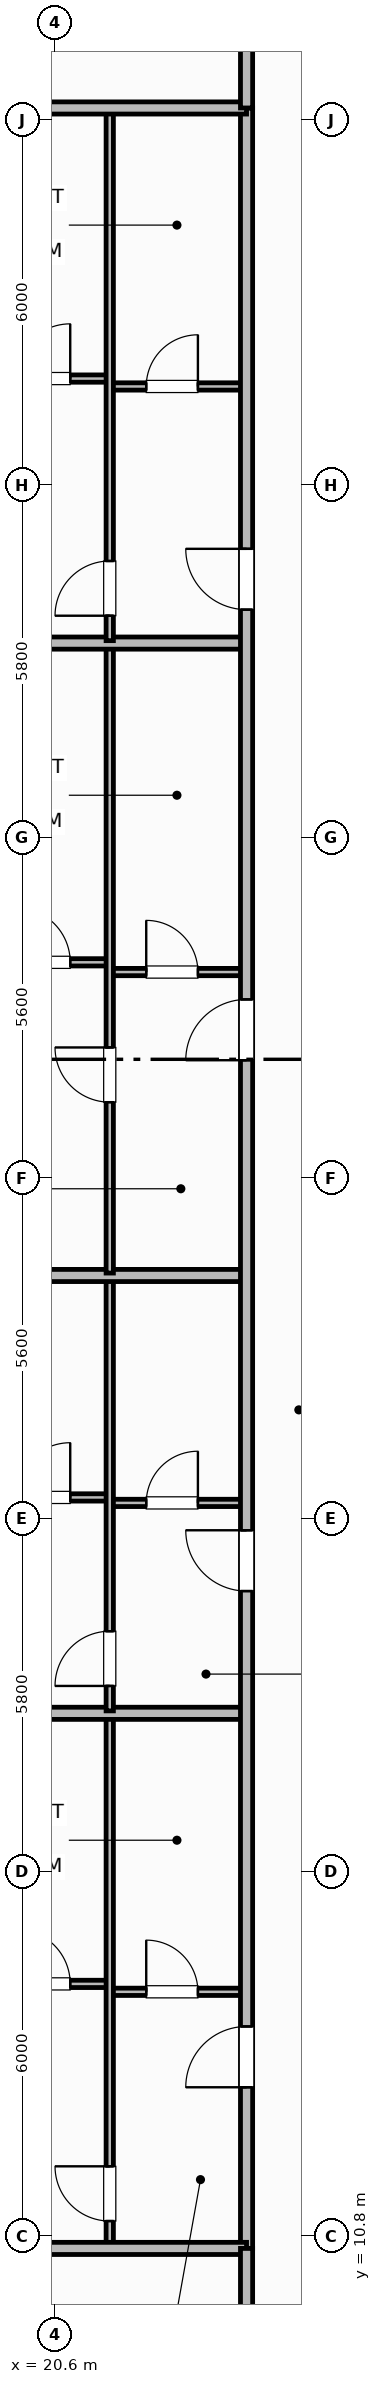
"""IFC4 building model, lengths in metres.
Left out: names, types, materials, properties, quantities, classifications, styles, units other than length and angle.
Written with IfcOpenShell. Run it as: python <this file> out.ifc"""

import sys

from ifc_helpers import new_model, si_unit, direction, frame, frame_2d, origin, place, context, subcontext, project, spatial, rectangle, extrude, element, fill, save


model = new_model("IFC4")
c1 = context("Model", 3, precision=1e-05, world=origin(), true_north=direction((0.0, 1.0)))
c2 = subcontext(c1, "Body", "Model", "MODEL_VIEW")
j1 = project(units=[si_unit("LENGTHUNIT", "METRE"), si_unit("PLANEANGLEUNIT", "RADIAN")], contexts=[c1])
p1 = place(None, origin())
s1 = spatial("IfcSite", under=j1, at=p1, CompositionType="ELEMENT")
p2 = place(p1, origin())
s2 = spatial("IfcBuilding", under=s1, at=p2, CompositionType="ELEMENT")
p3 = place(p2, frame((0.0, 0.0, 47.3)))
s3 = spatial("IfcBuildingStorey", under=s2, at=p3, CompositionType="ELEMENT", Elevation=47.3)
p4 = place(p3, frame((21.5, 14.82, 0.0), z_axis=(0.0, 0.0, 1.0), x_axis=(1.0, 0.0, 0.0)))
e1 = element("IfcWall", 1, at=p4, inside=s3, PredefinedType="PARTITIONING", context=c2, shape_type="SweptSolid", body=[
    extrude(rectangle(XDim=2.25, YDim=0.12, at=frame_2d((1.125, 0.0))), origin(), (0.0, 0.0, 1.0), 2.53),
])
p5 = place(p4, frame((0.6, 0.0, 0.0)))
e2 = element("IfcOpeningElement", 2, at=p5, cuts=e1, PredefinedType="OPENING", context=c2, shape_type="SweptSolid", body=[
    extrude(rectangle(XDim=0.85, YDim=2.1, at=frame_2d((0.425, 1.05))), frame((0.0, 0.07, 0.0), z_axis=(0.0, -1.0, 0.0), x_axis=(1.0, 0.0, 0.0)), (0.0, 0.0, 1.0), 0.14),
])
p6 = place(p3, frame((14.57, 14.95, 0.0), z_axis=(0.0, 0.0, 1.0), x_axis=(1.0, 0.0, 0.0)))
e3 = element("IfcWall", 3, at=p6, inside=s3, PredefinedType="PARTITIONING", context=c2, shape_type="SweptSolid", body=[
    extrude(rectangle(XDim=6.93, YDim=0.12, at=frame_2d((3.465, 0.0))), origin(), (0.0, 0.0, 1.0), 2.53),
])
p7 = place(p6, frame((5.38, 0.0, 0.0)))
e4 = element("IfcOpeningElement", 4, at=p7, cuts=e3, PredefinedType="OPENING", context=c2, shape_type="SweptSolid", body=[
    extrude(rectangle(XDim=0.9, YDim=2.1, at=frame_2d((0.45, 1.05))), frame((0.0, 0.07, 0.0), z_axis=(0.0, -1.0, 0.0), x_axis=(1.0, 0.0, 0.0)), (0.0, 0.0, 1.0), 0.14),
])
p8 = place(p3, frame((21.5, 10.64, 0.0), z_axis=(0.0, 0.0, 1.0), x_axis=(0.0, 1.0, 0.0)))
e5 = element("IfcWall", 5, at=p8, inside=s3, PredefinedType="PARTITIONING", context=c2, shape_type="SweptSolid", body=[
    extrude(rectangle(XDim=8.72, YDim=0.12, at=frame_2d((4.36, 0.0))), origin(), (0.0, 0.0, 1.0), 2.53),
])
p9 = place(p8, frame((0.41, 0.0, 0.0)))
e6 = element("IfcOpeningElement", 6, at=p9, cuts=e5, PredefinedType="OPENING", context=c2, shape_type="SweptSolid", body=[
    extrude(rectangle(XDim=0.9, YDim=2.1, at=frame_2d((0.45, 1.05))), frame((0.0, 0.07, 0.0), z_axis=(0.0, -1.0, 0.0), x_axis=(1.0, 0.0, 0.0)), (0.0, 0.0, 1.0), 0.14),
])
p10 = place(p3, frame((14.57, 19.4, 0.0), z_axis=(0.0, 0.0, 1.0), x_axis=(1.0, 0.0, 0.0)))
e7 = element("IfcWall", 7, at=p10, inside=s3, PredefinedType="PARTITIONING", context=c2, shape_type="SweptSolid", body=[
    extrude(rectangle(XDim=9.18, YDim=0.2, at=frame_2d((4.59, 0.0))), origin(), (0.0, 0.0, 1.0), 2.53),
])
p11 = place(p3, frame((21.5, 22.86, 0.0), z_axis=(0.0, 0.0, 1.0), x_axis=(1.0, 0.0, 0.0)))
e8 = element("IfcWall", 8, at=p11, inside=s3, PredefinedType="PARTITIONING", context=c2, shape_type="SweptSolid", body=[
    extrude(rectangle(XDim=2.25, YDim=0.12, at=frame_2d((1.125, 0.0))), origin(), (0.0, 0.0, 1.0), 2.53),
])
p12 = place(p11, frame((0.6, 0.0, 0.0)))
e9 = element("IfcOpeningElement", 9, at=p12, cuts=e8, PredefinedType="OPENING", context=c2, shape_type="SweptSolid", body=[
    extrude(rectangle(XDim=0.85, YDim=2.1, at=frame_2d((0.425, 1.05))), frame((0.0, 0.07, 0.0), z_axis=(0.0, -1.0, 0.0), x_axis=(1.0, 0.0, 0.0)), (0.0, 0.0, 1.0), 0.14),
])
p13 = place(p3, frame((14.57, 22.95, 0.0), z_axis=(0.0, 0.0, 1.0), x_axis=(1.0, 0.0, 0.0)))
e10 = element("IfcWall", 10, at=p13, inside=s3, PredefinedType="PARTITIONING", context=c2, shape_type="SweptSolid", body=[
    extrude(rectangle(XDim=6.93, YDim=0.12, at=frame_2d((3.465, 0.0))), origin(), (0.0, 0.0, 1.0), 2.53),
])
p14 = place(p13, frame((5.38, 0.0, 0.0)))
e11 = element("IfcOpeningElement", 11, at=p14, cuts=e10, PredefinedType="OPENING", context=c2, shape_type="SweptSolid", body=[
    extrude(rectangle(XDim=0.9, YDim=2.1, at=frame_2d((0.45, 1.05))), frame((0.0, 0.07, 0.0), z_axis=(0.0, -1.0, 0.0), x_axis=(1.0, 0.0, 0.0)), (0.0, 0.0, 1.0), 0.14),
])
p15 = place(p3, frame((21.5, 19.44, 0.0), z_axis=(0.0, 0.0, 1.0), x_axis=(0.0, 1.0, 0.0)))
e12 = element("IfcWall", 12, at=p15, inside=s3, PredefinedType="PARTITIONING", context=c2, shape_type="SweptSolid", body=[
    extrude(rectangle(XDim=7.12, YDim=0.12, at=frame_2d((3.56, 0.0))), origin(), (0.0, 0.0, 1.0), 2.53),
])
p16 = place(p15, frame((0.41, 0.0, 0.0)))
e13 = element("IfcOpeningElement", 13, at=p16, cuts=e12, PredefinedType="OPENING", context=c2, shape_type="SweptSolid", body=[
    extrude(rectangle(XDim=0.9, YDim=2.1, at=frame_2d((0.45, 1.05))), frame((0.0, 0.07, 0.0), z_axis=(0.0, -1.0, 0.0), x_axis=(1.0, 0.0, 0.0)), (0.0, 0.0, 1.0), 0.14),
])
p17 = place(p3, frame((15.284, 26.6, 0.0), z_axis=(0.0, 0.0, 1.0), x_axis=(1.0, 0.0, 0.0)))
e14 = element("IfcWall", 14, at=p17, inside=s3, PredefinedType="PARTITIONING", context=c2, shape_type="SweptSolid", body=[
    extrude(rectangle(XDim=8.466, YDim=0.2, at=frame_2d((4.233, 0.0))), origin(), (0.0, 0.0, 1.0), 2.53),
])
p18 = place(p3, frame((21.5, 31.59, 0.0), z_axis=(0.0, 0.0, 1.0), x_axis=(1.0, 0.0, 0.0)))
e15 = element("IfcWall", 15, at=p18, inside=s3, PredefinedType="PARTITIONING", context=c2, shape_type="SweptSolid", body=[
    extrude(rectangle(XDim=2.25, YDim=0.12, at=frame_2d((1.125, 0.0))), origin(), (0.0, 0.0, 1.0), 2.53),
])
p19 = place(p18, frame((0.6, 0.0, 0.0)))
e16 = element("IfcOpeningElement", 16, at=p19, cuts=e15, PredefinedType="OPENING", context=c2, shape_type="SweptSolid", body=[
    extrude(rectangle(XDim=0.85, YDim=2.1, at=frame_2d((0.425, 1.05))), frame((0.0, 0.07, 0.0), z_axis=(0.0, -1.0, 0.0), x_axis=(1.0, 0.0, 0.0)), (0.0, 0.0, 1.0), 0.14),
])
p20 = place(p3, frame((15.053, 31.75, 0.0), z_axis=(0.0, 0.0, 1.0), x_axis=(1.0, 0.0, 0.0)))
e17 = element("IfcWall", 17, at=p20, inside=s3, PredefinedType="PARTITIONING", context=c2, shape_type="SweptSolid", body=[
    extrude(rectangle(XDim=6.447, YDim=0.12, at=frame_2d((3.224, 0.0))), origin(), (0.0, 0.0, 1.0), 2.53),
])
p21 = place(p20, frame((4.897, 0.0, 0.0)))
e18 = element("IfcOpeningElement", 18, at=p21, cuts=e17, PredefinedType="OPENING", context=c2, shape_type="SweptSolid", body=[
    extrude(rectangle(XDim=0.9, YDim=2.1, at=frame_2d((0.45, 1.05))), frame((0.0, 0.07, 0.0), z_axis=(0.0, -1.0, 0.0), x_axis=(1.0, 0.0, 0.0)), (0.0, 0.0, 1.0), 0.14),
])
p22 = place(p3, frame((21.5, 26.64, 0.0), z_axis=(0.0, 0.0, 1.0), x_axis=(0.0, 1.0, 0.0)))
e19 = element("IfcWall", 19, at=p22, inside=s3, PredefinedType="PARTITIONING", context=c2, shape_type="SweptSolid", body=[
    extrude(rectangle(XDim=10.32, YDim=0.12, at=frame_2d((5.16, 0.0))), origin(), (0.0, 0.0, 1.0), 2.53),
])
p23 = place(p22, frame((2.81, 0.0, 0.0)))
e20 = element("IfcOpeningElement", 20, at=p23, cuts=e19, PredefinedType="OPENING", context=c2, shape_type="SweptSolid", body=[
    extrude(rectangle(XDim=0.9, YDim=2.1, at=frame_2d((0.45, 1.05))), frame((0.0, 0.07, 0.0), z_axis=(0.0, -1.0, 0.0), x_axis=(1.0, 0.0, 0.0)), (0.0, 0.0, 1.0), 0.14),
])
p24 = place(p3, frame((14.57, 37.0, 0.0), z_axis=(0.0, 0.0, 1.0), x_axis=(1.0, 0.0, 0.0)))
e21 = element("IfcWall", 21, at=p24, inside=s3, PredefinedType="PARTITIONING", context=c2, shape_type="SweptSolid", body=[
    extrude(rectangle(XDim=9.18, YDim=0.2, at=frame_2d((4.59, 0.0))), origin(), (0.0, 0.0, 1.0), 2.53),
])
p25 = place(p3, frame((21.5, 41.22, 0.0), z_axis=(0.0, 0.0, 1.0), x_axis=(1.0, 0.0, 0.0)))
e22 = element("IfcWall", 22, at=p25, inside=s3, PredefinedType="PARTITIONING", context=c2, shape_type="SweptSolid", body=[
    extrude(rectangle(XDim=2.25, YDim=0.12, at=frame_2d((1.125, 0.0))), origin(), (0.0, 0.0, 1.0), 2.53),
])
p26 = place(p25, frame((0.6, 0.0, 0.0)))
e23 = element("IfcOpeningElement", 23, at=p26, cuts=e22, PredefinedType="OPENING", context=c2, shape_type="SweptSolid", body=[
    extrude(rectangle(XDim=0.85, YDim=2.1, at=frame_2d((0.425, 1.05))), frame((0.0, 0.07, 0.0), z_axis=(0.0, -1.0, 0.0), x_axis=(1.0, 0.0, 0.0)), (0.0, 0.0, 1.0), 0.14),
])
p27 = place(p3, frame((14.57, 41.35, 0.0), z_axis=(0.0, 0.0, 1.0), x_axis=(1.0, 0.0, 0.0)))
e24 = element("IfcWall", 24, at=p27, inside=s3, PredefinedType="PARTITIONING", context=c2, shape_type="SweptSolid", body=[
    extrude(rectangle(XDim=6.93, YDim=0.12, at=frame_2d((3.465, 0.0))), origin(), (0.0, 0.0, 1.0), 2.53),
])
p28 = place(p27, frame((5.38, 0.0, 0.0)))
e25 = element("IfcOpeningElement", 25, at=p28, cuts=e24, PredefinedType="OPENING", context=c2, shape_type="SweptSolid", body=[
    extrude(rectangle(XDim=0.9, YDim=2.1, at=frame_2d((0.45, 1.05))), frame((0.0, 0.07, 0.0), z_axis=(0.0, -1.0, 0.0), x_axis=(1.0, 0.0, 0.0)), (0.0, 0.0, 1.0), 0.14),
])
p29 = place(p3, frame((21.5, 37.04, 0.0), z_axis=(0.0, 0.0, 1.0), x_axis=(0.0, 1.0, 0.0)))
e26 = element("IfcWall", 26, at=p29, inside=s3, PredefinedType="PARTITIONING", context=c2, shape_type="SweptSolid", body=[
    extrude(rectangle(XDim=8.72, YDim=0.12, at=frame_2d((4.36, 0.0))), origin(), (0.0, 0.0, 1.0), 2.53),
])
p30 = place(p29, frame((0.41, 0.0, 0.0)))
e27 = element("IfcOpeningElement", 27, at=p30, cuts=e26, PredefinedType="OPENING", context=c2, shape_type="SweptSolid", body=[
    extrude(rectangle(XDim=0.9, YDim=2.1, at=frame_2d((0.45, 1.05))), frame((0.0, 0.07, 0.0), z_axis=(0.0, -1.0, 0.0), x_axis=(1.0, 0.0, 0.0)), (0.0, 0.0, 1.0), 0.14),
])
p31 = place(p3, frame((23.75, 10.6, 0.0), z_axis=(0.0, 0.0, 1.0), x_axis=(0.0, 1.0, 0.0)))
e28 = element("IfcWall", 28, at=p31, inside=s3, PredefinedType="PARTITIONING", context=c2, shape_type="SweptSolid", body=[
    extrude(rectangle(XDim=35.2, YDim=0.2, at=frame_2d((17.6, 0.0))), origin(), (0.0, 0.0, 1.0), 2.53),
])
p32 = place(p31, frame((2.65, 0.0, 0.0)))
e29 = element("IfcOpeningElement", 29, at=p32, cuts=e28, PredefinedType="OPENING", context=c2, shape_type="SweptSolid", body=[
    extrude(rectangle(XDim=1.0, YDim=2.15, at=frame_2d((0.5, 1.075))), frame((0.0, 0.11, 0.0), z_axis=(0.0, -1.0, 0.0), x_axis=(1.0, 0.0, 0.0)), (0.0, 0.0, 1.0), 0.22),
])
p33 = place(p31, frame((10.81, 0.0, 0.0)))
e30 = element("IfcOpeningElement", 30, at=p33, cuts=e28, PredefinedType="OPENING", context=c2, shape_type="SweptSolid", body=[
    extrude(rectangle(XDim=1.0, YDim=2.15, at=frame_2d((0.5, 1.075))), frame((0.0, 0.11, 0.0), z_axis=(0.0, -1.0, 0.0), x_axis=(1.0, 0.0, 0.0)), (0.0, 0.0, 1.0), 0.22),
])
p34 = place(p31, frame((19.54, 0.0, 0.0)))
e31 = element("IfcOpeningElement", 31, at=p34, cuts=e28, PredefinedType="OPENING", context=c2, shape_type="SweptSolid", body=[
    extrude(rectangle(XDim=1.0, YDim=2.15, at=frame_2d((0.5, 1.075))), frame((0.0, 0.11, 0.0), z_axis=(0.0, -1.0, 0.0), x_axis=(1.0, 0.0, 0.0)), (0.0, 0.0, 1.0), 0.22),
])
p35 = place(p31, frame((26.95, 0.0, 0.0)))
e32 = element("IfcOpeningElement", 32, at=p35, cuts=e28, PredefinedType="OPENING", context=c2, shape_type="SweptSolid", body=[
    extrude(rectangle(XDim=1.0, YDim=2.15, at=frame_2d((0.5, 1.075))), frame((0.0, 0.11, 0.0), z_axis=(0.0, -1.0, 0.0), x_axis=(1.0, 0.0, 0.0)), (0.0, 0.0, 1.0), 0.22),
])
for number, where, z_axis, x_axis in (
    (33, (14.99, 10.6, 0.0), (0.0, 0.0, 1.0), (1.0, 0.0, 0.0)),
    (34, (14.99, 45.8, 0.0), (0.0, 0.0, 1.0), (1.0, 0.0, 0.0)),
):
    element("IfcWall", number, at=place(p3, frame(where, z_axis=z_axis, x_axis=x_axis)), inside=s3, PredefinedType="PARTITIONING", context=c2, shape_type="SweptSolid", body=[
        extrude(rectangle(XDim=8.76, YDim=0.2, at=frame_2d((4.38, 0.0))), origin(), (0.0, 0.0, 1.0), 2.53),
    ])
p36 = place(p3, frame((23.75, 4.97, 0.0), z_axis=(0.0, 0.0, 1.0), x_axis=(0.0, 1.0, 0.0)))
e35 = element("IfcWall", 35, at=p36, inside=s3, PredefinedType="PARTITIONING", context=c2, shape_type="SweptSolid", body=[
    extrude(rectangle(XDim=5.63, YDim=0.2, at=frame_2d((2.815, 0.0))), origin(), (0.0, 0.0, 1.0), 2.53),
])
p37 = place(p3, frame((23.75, 45.8, 0.0), z_axis=(0.0, 0.0, 1.0), x_axis=(0.0, 1.0, 0.0)))
e36 = element("IfcWall", 36, at=p37, inside=s3, PredefinedType="PARTITIONING", context=c2, shape_type="SweptSolid", body=[
    extrude(rectangle(XDim=5.63, YDim=0.2, at=frame_2d((2.815, 0.0))), origin(), (0.0, 0.0, 1.0), 2.53),
])
p38 = place(p5, origin())
e37 = element("IfcDoor", 37, at=p38, inside=s3, OperationType="SINGLE_SWING_LEFT", PredefinedType="DOOR", context=c2, shape_type="SweptSolid", body=[
    extrude(rectangle(XDim=0.85, YDim=2.1, at=frame_2d((0.425, 1.05))), frame((0.0, 0.025, 0.0), z_axis=(0.0, -1.0, 0.0), x_axis=(1.0, 0.0, 0.0)), (0.0, 0.0, 1.0), 0.05),
])
fill(e2, e37)
p39 = place(p7, origin())
e38 = element("IfcDoor", 38, at=p39, inside=s3, OperationType="SINGLE_SWING_LEFT", PredefinedType="DOOR", context=c2, shape_type="SweptSolid", body=[
    extrude(rectangle(XDim=0.9, YDim=2.1, at=frame_2d((0.45, 1.05))), frame((0.0, 0.025, 0.0), z_axis=(0.0, -1.0, 0.0), x_axis=(1.0, 0.0, 0.0)), (0.0, 0.0, 1.0), 0.05),
])
fill(e4, e38)
p40 = place(p9, origin())
e39 = element("IfcDoor", 39, at=p40, inside=s3, OperationType="SINGLE_SWING_RIGHT", PredefinedType="DOOR", context=c2, shape_type="SweptSolid", body=[
    extrude(rectangle(XDim=0.9, YDim=2.1, at=frame_2d((0.45, 1.05))), frame((0.0, 0.025, 0.0), z_axis=(0.0, -1.0, 0.0), x_axis=(1.0, 0.0, 0.0)), (0.0, 0.0, 1.0), 0.05),
])
fill(e6, e39)
p41 = place(p12, origin())
e40 = element("IfcDoor", 40, at=p41, inside=s3, OperationType="SINGLE_SWING_RIGHT", PredefinedType="DOOR", context=c2, shape_type="SweptSolid", body=[
    extrude(rectangle(XDim=0.85, YDim=2.1, at=frame_2d((0.425, 1.05))), frame((0.0, 0.025, 0.0), z_axis=(0.0, -1.0, 0.0), x_axis=(1.0, 0.0, 0.0)), (0.0, 0.0, 1.0), 0.05),
])
fill(e9, e40)
p42 = place(p14, origin())
e41 = element("IfcDoor", 41, at=p42, inside=s3, OperationType="SINGLE_SWING_RIGHT", PredefinedType="DOOR", context=c2, shape_type="SweptSolid", body=[
    extrude(rectangle(XDim=0.9, YDim=2.1, at=frame_2d((0.45, 1.05))), frame((0.0, 0.025, 0.0), z_axis=(0.0, -1.0, 0.0), x_axis=(1.0, 0.0, 0.0)), (0.0, 0.0, 1.0), 0.05),
])
fill(e11, e41)
p43 = place(p16, origin())
e42 = element("IfcDoor", 42, at=p43, inside=s3, OperationType="SINGLE_SWING_LEFT", PredefinedType="DOOR", context=c2, shape_type="SweptSolid", body=[
    extrude(rectangle(XDim=0.9, YDim=2.1, at=frame_2d((0.45, 1.05))), frame((0.0, 0.025, 0.0), z_axis=(0.0, -1.0, 0.0), x_axis=(1.0, 0.0, 0.0)), (0.0, 0.0, 1.0), 0.05),
])
fill(e13, e42)
p44 = place(p19, origin())
e43 = element("IfcDoor", 43, at=p44, inside=s3, OperationType="SINGLE_SWING_LEFT", PredefinedType="DOOR", context=c2, shape_type="SweptSolid", body=[
    extrude(rectangle(XDim=0.85, YDim=2.1, at=frame_2d((0.425, 1.05))), frame((0.0, 0.025, 0.0), z_axis=(0.0, -1.0, 0.0), x_axis=(1.0, 0.0, 0.0)), (0.0, 0.0, 1.0), 0.05),
])
fill(e16, e43)
p45 = place(p21, origin())
e44 = element("IfcDoor", 44, at=p45, inside=s3, OperationType="SINGLE_SWING_LEFT", PredefinedType="DOOR", context=c2, shape_type="SweptSolid", body=[
    extrude(rectangle(XDim=0.9, YDim=2.1, at=frame_2d((0.45, 1.05))), frame((0.0, 0.025, 0.0), z_axis=(0.0, -1.0, 0.0), x_axis=(1.0, 0.0, 0.0)), (0.0, 0.0, 1.0), 0.05),
])
fill(e18, e44)
p46 = place(p23, origin())
e45 = element("IfcDoor", 45, at=p46, inside=s3, OperationType="SINGLE_SWING_RIGHT", PredefinedType="DOOR", context=c2, shape_type="SweptSolid", body=[
    extrude(rectangle(XDim=0.9, YDim=2.1, at=frame_2d((0.45, 1.05))), frame((0.0, 0.025, 0.0), z_axis=(0.0, -1.0, 0.0), x_axis=(1.0, 0.0, 0.0)), (0.0, 0.0, 1.0), 0.05),
])
fill(e20, e45)
p47 = place(p26, origin())
e46 = element("IfcDoor", 46, at=p47, inside=s3, OperationType="SINGLE_SWING_RIGHT", PredefinedType="DOOR", context=c2, shape_type="SweptSolid", body=[
    extrude(rectangle(XDim=0.85, YDim=2.1, at=frame_2d((0.425, 1.05))), frame((0.0, 0.025, 0.0), z_axis=(0.0, -1.0, 0.0), x_axis=(1.0, 0.0, 0.0)), (0.0, 0.0, 1.0), 0.05),
])
fill(e23, e46)
p48 = place(p28, origin())
e47 = element("IfcDoor", 47, at=p48, inside=s3, OperationType="SINGLE_SWING_RIGHT", PredefinedType="DOOR", context=c2, shape_type="SweptSolid", body=[
    extrude(rectangle(XDim=0.9, YDim=2.1, at=frame_2d((0.45, 1.05))), frame((0.0, 0.025, 0.0), z_axis=(0.0, -1.0, 0.0), x_axis=(1.0, 0.0, 0.0)), (0.0, 0.0, 1.0), 0.05),
])
fill(e25, e47)
p49 = place(p30, origin())
e48 = element("IfcDoor", 48, at=p49, inside=s3, OperationType="SINGLE_SWING_LEFT", PredefinedType="DOOR", context=c2, shape_type="SweptSolid", body=[
    extrude(rectangle(XDim=0.9, YDim=2.1, at=frame_2d((0.45, 1.05))), frame((0.0, 0.025, 0.0), z_axis=(0.0, -1.0, 0.0), x_axis=(1.0, 0.0, 0.0)), (0.0, 0.0, 1.0), 0.05),
])
fill(e27, e48)
p50 = place(p32, origin())
e49 = element("IfcDoor", 49, at=p50, inside=s3, OperationType="SINGLE_SWING_LEFT", PredefinedType="DOOR", context=c2, shape_type="SweptSolid", body=[
    extrude(rectangle(XDim=1.0, YDim=2.15, at=frame_2d((0.5, 1.075))), frame((0.0, 0.025, 0.0), z_axis=(0.0, -1.0, 0.0), x_axis=(1.0, 0.0, 0.0)), (0.0, 0.0, 1.0), 0.05),
])
fill(e29, e49)
p51 = place(p33, origin())
e50 = element("IfcDoor", 50, at=p51, inside=s3, OperationType="SINGLE_SWING_RIGHT", PredefinedType="DOOR", context=c2, shape_type="SweptSolid", body=[
    extrude(rectangle(XDim=1.0, YDim=2.15, at=frame_2d((0.5, 1.075))), frame((0.0, 0.025, 0.0), z_axis=(0.0, -1.0, 0.0), x_axis=(1.0, 0.0, 0.0)), (0.0, 0.0, 1.0), 0.05),
])
fill(e30, e50)
p52 = place(p34, origin())
e51 = element("IfcDoor", 51, at=p52, inside=s3, OperationType="SINGLE_SWING_LEFT", PredefinedType="DOOR", context=c2, shape_type="SweptSolid", body=[
    extrude(rectangle(XDim=1.0, YDim=2.15, at=frame_2d((0.5, 1.075))), frame((0.0, 0.025, 0.0), z_axis=(0.0, -1.0, 0.0), x_axis=(1.0, 0.0, 0.0)), (0.0, 0.0, 1.0), 0.05),
])
fill(e31, e51)
p53 = place(p35, origin())
e52 = element("IfcDoor", 52, at=p53, inside=s3, OperationType="SINGLE_SWING_RIGHT", PredefinedType="DOOR", context=c2, shape_type="SweptSolid", body=[
    extrude(rectangle(XDim=1.0, YDim=2.15, at=frame_2d((0.5, 1.075))), frame((0.0, 0.025, 0.0), z_axis=(0.0, -1.0, 0.0), x_axis=(1.0, 0.0, 0.0)), (0.0, 0.0, 1.0), 0.05),
])
fill(e32, e52)
save(model, sys.argv[1])
